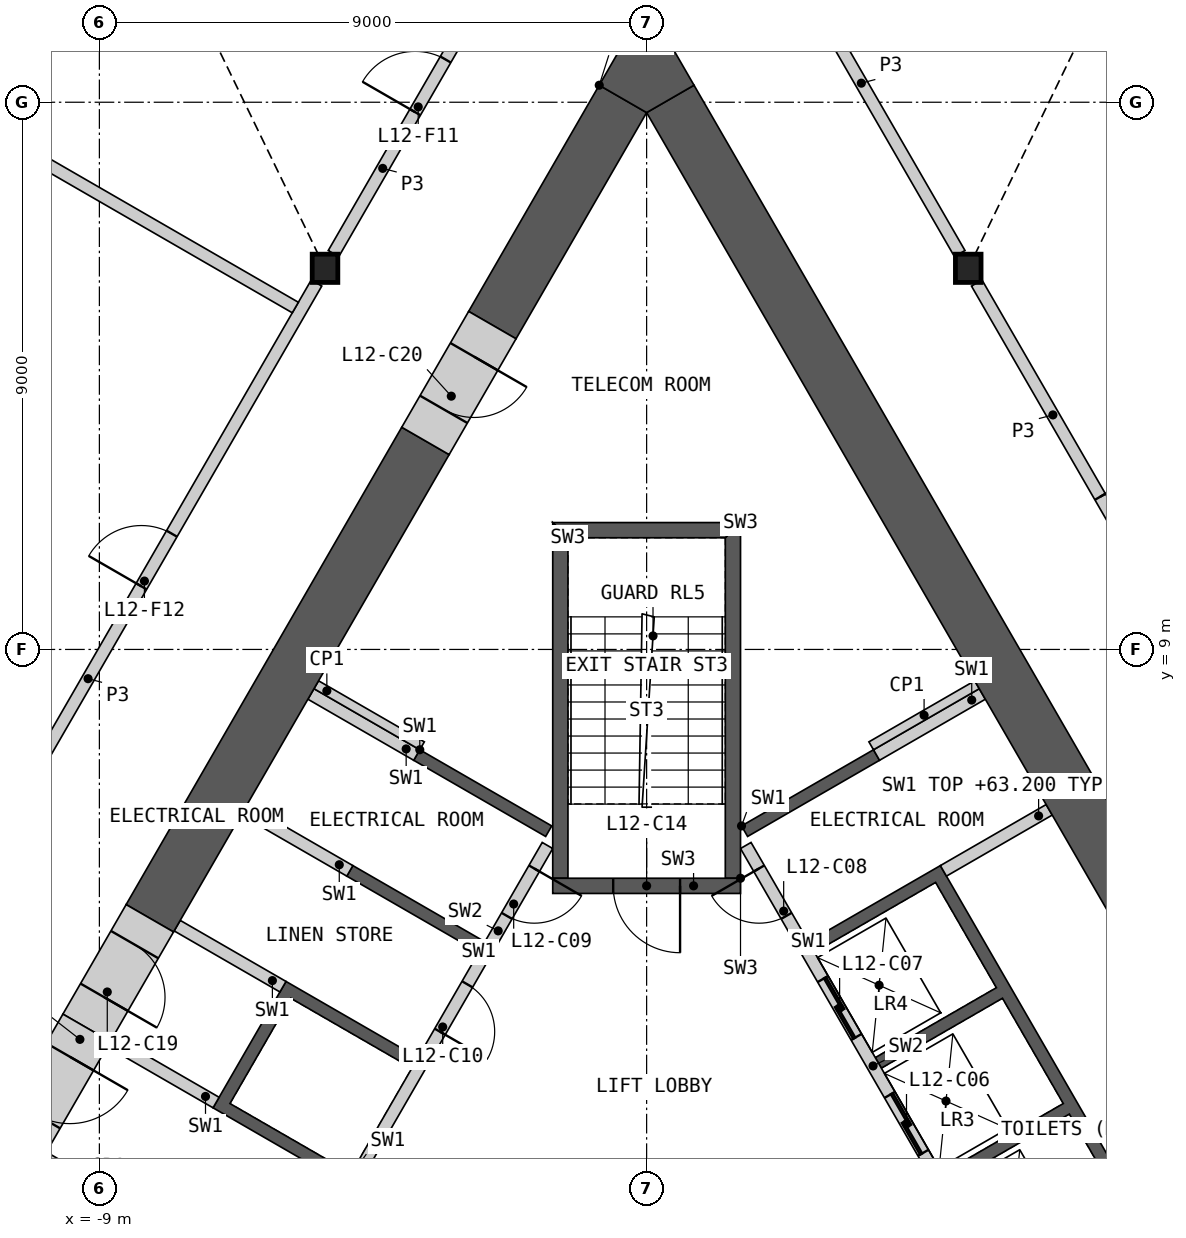
"""IFC4 building model, lengths in metres.
Left out: names, types, materials, properties, quantities, classifications, styles, units other than length and angle.
Written with IfcOpenShell. Run it as: python <this file> out.ifc"""

import sys

from ifc_helpers import new_model, si_unit, direction, frame, frame_2d, origin, origin_2d, place, context, subcontext, project, spatial, polyline, rectangle, i_section, outline, extrude, element, fill, save


model = new_model("IFC4")
c1 = context("Model", 3, precision=1e-05, world=origin(), true_north=direction((0.0, 1.0)))
c2 = subcontext(c1, "Body", "Model", "MODEL_VIEW")
j1 = project(units=[si_unit("LENGTHUNIT", "METRE"), si_unit("PLANEANGLEUNIT", "RADIAN")], contexts=[c1])
p1 = place(None, origin())
s1 = spatial("IfcSite", under=j1, at=p1, CompositionType="ELEMENT")
p2 = place(p1, origin())
s2 = spatial("IfcBuilding", under=s1, at=p2, CompositionType="ELEMENT")
p3 = place(p2, frame((0.0, 0.0, 59.4)))
s3 = spatial("IfcBuildingStorey", under=s2, at=p3, CompositionType="ELEMENT", Elevation=59.4)
for number, where, z_axis, x_axis in (
    (1, (-5.289, 15.269, 0.0), (0.0, 0.0, 1.0), (1.0, 0.0, 0.0)),
    (2, (5.289, 15.269, 0.0), (0.0, 0.0, 1.0), (1.0, 0.0, 0.0)),
):
    element("IfcColumn", number, at=place(p3, frame(where, z_axis=z_axis, x_axis=x_axis)), inside=s3, PredefinedType="COLUMN", context=c2, shape_type="SweptSolid", body=[
        extrude(i_section(OverallWidth=0.421, OverallDepth=0.465, WebThickness=0.045, FlangeThickness=0.072, at=origin_2d()), origin(), (0.0, 0.0, 1.0), 4.2),
    ])
p4 = place(p3, origin())
e3 = element("IfcWall", 3, at=p4, inside=s3, PredefinedType="SHEAR", context=c2, shape_type="SweptSolid", body=[
    extrude(outline(polyline([(1.561, 6.097), (3.731, 7.35), (3.831, 7.177), (1.66, 5.924), (1.561, 6.097)])), origin(), (0.0, 0.0, 1.0), 3.8),
])
p5 = place(p3, origin())
e4 = element("IfcWall", 4, at=p5, inside=s3, PredefinedType="SHEAR", context=c2, shape_type="SweptSolid", body=[
    extrude(outline(polyline([(2.66, 4.192), (4.831, 5.445), (8.231, -0.444), (6.061, -1.697), (5.96, -1.524), (7.952, -0.374), (6.952, 1.358), (4.96, 0.208), (4.861, 0.381), (6.852, 1.531), (5.852, 3.263), (3.861, 2.113), (3.76, 2.287), (5.752, 3.437), (4.752, 5.169), (2.76, 4.019), (2.66, 4.192)])), origin(), (0.0, 0.0, 1.0), 3.8),
])
p6 = place(p3, frame((5.817, -1.476, 0.0), z_axis=(0.0, 0.0, 1.0), x_axis=(-0.500002616675, 0.866023893041, 0.0)))
e5 = element("IfcWall", 5, at=p6, inside=s3, PredefinedType="SOLIDWALL", context=c2, shape_type="SweptSolid", body=[
    extrude(rectangle(XDim=8.373, YDim=0.2, at=frame_2d((4.187, 0.0))), origin(), (0.0, 0.0, 1.0), 3.8),
])
p7 = place(p6, frame((0.337, 0.0, 0.0)))
e6 = element("IfcOpeningElement", 6, at=p7, cuts=e5, PredefinedType="OPENING", context=c2, shape_type="SweptSolid", body=[
    extrude(rectangle(XDim=1.1, YDim=2.1, at=frame_2d((0.55, 1.05))), frame((0.0, 0.11, 0.0), z_axis=(0.0, -1.0, 0.0), x_axis=(1.0, 0.0, 0.0)), (0.0, 0.0, 1.0), 0.22),
])
p8 = place(p6, frame((2.537, 0.0, 0.0)))
e7 = element("IfcOpeningElement", 7, at=p8, cuts=e5, PredefinedType="OPENING", context=c2, shape_type="SweptSolid", body=[
    extrude(rectangle(XDim=1.1, YDim=2.1, at=frame_2d((0.55, 1.05))), frame((0.0, 0.11, 0.0), z_axis=(0.0, -1.0, 0.0), x_axis=(1.0, 0.0, 0.0)), (0.0, 0.0, 1.0), 0.22),
])
p9 = place(p6, frame((4.737, 0.0, 0.0)))
e8 = element("IfcOpeningElement", 8, at=p9, cuts=e5, PredefinedType="OPENING", context=c2, shape_type="SweptSolid", body=[
    extrude(rectangle(XDim=1.1, YDim=2.1, at=frame_2d((0.55, 1.05))), frame((0.0, 0.11, 0.0), z_axis=(0.0, -1.0, 0.0), x_axis=(1.0, 0.0, 0.0)), (0.0, 0.0, 1.0), 0.22),
])
p10 = place(p6, frame((7.037, 0.0, 0.0)))
e9 = element("IfcOpeningElement", 9, at=p10, cuts=e5, PredefinedType="OPENING", context=c2, shape_type="SweptSolid", body=[
    extrude(rectangle(XDim=0.9, YDim=2.1, at=frame_2d((0.45, 1.05))), frame((0.0, 0.11, 0.0), z_axis=(0.0, -1.0, 0.0), x_axis=(1.0, 0.0, 0.0)), (0.0, 0.0, 1.0), 0.22),
])
p11 = place(p3, frame((4.881, 5.358, 0.0), z_axis=(0.0, 0.0, 1.0), x_axis=(0.866035824272, 0.499981950752, 0.0)))
e10 = element("IfcWall", 10, at=p11, inside=s3, PredefinedType="SHEAR", context=c2, shape_type="SweptSolid", body=[
    extrude(rectangle(XDim=2.009, YDim=0.2, at=frame_2d((1.004, 0.0))), origin(), (0.0, 0.0, 1.0), 3.8),
])
p12 = place(p3, frame((3.781, 7.263, 0.0), z_axis=(0.0, 0.0, 1.0), x_axis=(0.865983199114, 0.50007309351, 0.0)))
e11 = element("IfcWall", 11, at=p12, inside=s3, PredefinedType="SHEAR", context=c2, shape_type="SweptSolid", body=[
    extrude(rectangle(XDim=2.009, YDim=0.2, at=frame_2d((1.004, 0.0))), origin(), (0.0, 0.0, 1.0), 3.8),
])
p13 = place(p3, origin())
e12 = element("IfcWall", 12, at=p13, inside=s3, PredefinedType="SHEAR", context=c2, shape_type="SweptSolid", body=[
    extrude(outline(polyline([(-4.96, 0.208), (-7.131, 1.461), (-5.931, 3.54), (-3.76, 2.287), (-3.861, 2.113), (-5.852, 3.263), (-6.852, 1.531), (-4.861, 0.381), (-4.96, 0.208)])), origin(), (0.0, 0.0, 1.0), 3.8),
])
p14 = place(p3, origin())
e13 = element("IfcWall", 13, at=p14, inside=s3, PredefinedType="SHEAR", context=c2, shape_type="SweptSolid", body=[
    extrude(outline(polyline([(-2.76, 4.019), (-4.931, 5.272), (-4.831, 5.445), (-2.66, 4.192), (-2.76, 4.019)])), origin(), (0.0, 0.0, 1.0), 3.8),
])
p15 = place(p3, origin())
e14 = element("IfcWall", 14, at=p15, inside=s3, PredefinedType="SHEAR", context=c2, shape_type="SweptSolid", body=[
    extrude(outline(polyline([(-3.731, 7.35), (-1.561, 6.097), (-1.66, 5.924), (-3.831, 7.177), (-3.731, 7.35)])), origin(), (0.0, 0.0, 1.0), 3.8),
])
p16 = place(p3, frame((-1.631, 5.776, 0.0), z_axis=(0.0, 0.0, 1.0), x_axis=(-0.499992876559, -0.866029516466, 0.0)))
e15 = element("IfcWall", 15, at=p16, inside=s3, PredefinedType="SOLIDWALL", context=c2, shape_type="SweptSolid", body=[
    extrude(rectangle(XDim=6.486, YDim=0.2, at=frame_2d((3.243, 0.0))), origin(), (0.0, 0.0, 1.0), 3.8),
])
p17 = place(p16, frame((0.437, 0.0, 0.0)))
e16 = element("IfcOpeningElement", 16, at=p17, cuts=e15, PredefinedType="OPENING", context=c2, shape_type="SweptSolid", body=[
    extrude(rectangle(XDim=0.9, YDim=2.1, at=frame_2d((0.45, 1.05))), frame((0.0, 0.11, 0.0), z_axis=(0.0, -1.0, 0.0), x_axis=(1.0, 0.0, 0.0)), (0.0, 0.0, 1.0), 0.22),
])
p18 = place(p16, frame((2.637, 0.0, 0.0)))
e17 = element("IfcOpeningElement", 17, at=p18, cuts=e15, PredefinedType="OPENING", context=c2, shape_type="SweptSolid", body=[
    extrude(rectangle(XDim=0.9, YDim=2.1, at=frame_2d((0.45, 1.05))), frame((0.0, 0.11, 0.0), z_axis=(0.0, -1.0, 0.0), x_axis=(1.0, 0.0, 0.0)), (0.0, 0.0, 1.0), 0.22),
])
p19 = place(p3, frame((-3.781, 7.263, 0.0), z_axis=(0.0, 0.0, 1.0), x_axis=(-0.865983199114, 0.50007309351, 0.0)))
e18 = element("IfcWall", 18, at=p19, inside=s3, PredefinedType="SHEAR", context=c2, shape_type="SweptSolid", body=[
    extrude(rectangle(XDim=2.009, YDim=0.2, at=frame_2d((1.004, 0.0))), origin(), (0.0, 0.0, 1.0), 3.8),
])
p20 = place(p3, frame((-4.881, 5.358, 0.0), z_axis=(0.0, 0.0, 1.0), x_axis=(-0.866035824272, 0.499981950752, 0.0)))
e19 = element("IfcWall", 19, at=p20, inside=s3, PredefinedType="SHEAR", context=c2, shape_type="SweptSolid", body=[
    extrude(rectangle(XDim=2.009, YDim=0.2, at=frame_2d((1.004, 0.0))), origin(), (0.0, 0.0, 1.0), 3.8),
])
p21 = place(p3, frame((-5.981, 3.453, 0.0), z_axis=(0.0, 0.0, 1.0), x_axis=(-0.866013584312, 0.500020471368, 0.0)))
e20 = element("IfcWall", 20, at=p21, inside=s3, PredefinedType="SHEAR", context=c2, shape_type="SweptSolid", body=[
    extrude(rectangle(XDim=2.009, YDim=0.2, at=frame_2d((1.005, 0.0))), origin(), (0.0, 0.0, 1.0), 3.8),
])
p22 = place(p3, frame((-7.081, 1.548, 0.0), z_axis=(0.0, 0.0, 1.0), x_axis=(-0.865983199114, 0.50007309351, 0.0)))
e21 = element("IfcWall", 21, at=p22, inside=s3, PredefinedType="SHEAR", context=c2, shape_type="SweptSolid", body=[
    extrude(rectangle(XDim=2.009, YDim=0.2, at=frame_2d((1.004, 0.0))), origin(), (0.0, 0.0, 1.0), 3.8),
])
p23 = place(p3, frame((-8.181, -0.357, 0.0), z_axis=(0.0, 0.0, 1.0), x_axis=(-0.866035824272, 0.499981950752, 0.0)))
e22 = element("IfcWall", 22, at=p23, inside=s3, PredefinedType="SHEAR", context=c2, shape_type="SweptSolid", body=[
    extrude(rectangle(XDim=2.009, YDim=0.2, at=frame_2d((1.004, 0.0))), origin(), (0.0, 0.0, 1.0), 3.8),
])
p24 = place(p3, origin())
e23 = element("IfcWall", 23, at=p24, inside=s3, PredefinedType="SHEAR", context=c2, shape_type="SweptSolid", body=[
    extrude(outline(polyline([(1.544, 5.237), (1.544, 11.087), (1.294, 10.837), (1.294, 5.237), (1.544, 5.237)])), origin(), (0.0, 0.0, 1.0), 3.8),
])
p25 = place(p3, origin())
e24 = element("IfcWall", 24, at=p25, inside=s3, PredefinedType="SHEAR", context=c2, shape_type="SweptSolid", body=[
    extrude(outline(polyline([(1.544, 11.087), (-1.544, 11.087), (-1.294, 10.837), (1.294, 10.837), (1.544, 11.087)])), origin(), (0.0, 0.0, 1.0), 3.8),
])
p26 = place(p3, origin())
e25 = element("IfcWall", 25, at=p26, inside=s3, PredefinedType="SHEAR", context=c2, shape_type="SweptSolid", body=[
    extrude(outline(polyline([(-1.294, 10.837), (-1.544, 11.087), (-1.544, 5.237), (-1.294, 5.237), (-1.294, 10.837)])), origin(), (0.0, 0.0, 1.0), 3.8),
])
p27 = place(p3, frame((1.544, 5.112, 0.0), z_axis=(0.0, 0.0, 1.0), x_axis=(-1.0, 0.0, 0.0)))
e26 = element("IfcWall", 26, at=p27, inside=s3, PredefinedType="SHEAR", context=c2, shape_type="SweptSolid", body=[
    extrude(rectangle(XDim=3.088, YDim=0.25, at=frame_2d((1.544, 0.0))), origin(), (0.0, 0.0, 1.0), 3.8),
])
p28 = place(p27, frame((0.994, 0.0, 0.0)))
e27 = element("IfcOpeningElement", 27, at=p28, cuts=e26, PredefinedType="OPENING", context=c2, shape_type="SweptSolid", body=[
    extrude(rectangle(XDim=1.1, YDim=2.1, at=frame_2d((0.55, 1.05))), frame((0.0, 0.135, 0.0), z_axis=(0.0, -1.0, 0.0), x_axis=(1.0, 0.0, 0.0)), (0.0, 0.0, 1.0), 0.27),
])
for number, where, z_axis, x_axis in (
    (28, (3.693, 7.415, 0.0), (0.0, 0.0, 1.0), (0.866, 0.5, 0.0)),
    (29, (-3.693, 7.415, 0.0), (0.0, 0.0, 1.0), (-0.866, 0.5, 0.0)),
):
    element("IfcWall", number, at=place(p3, frame(where, z_axis=z_axis, x_axis=x_axis)), inside=s3, PredefinedType="PARTITIONING", context=c2, shape_type="SweptSolid", body=[
        extrude(rectangle(XDim=2.009, YDim=0.15, at=frame_2d((1.004, 0.0))), origin(), (0.0, 0.0, 1.0), 3.8),
    ])
p29 = place(p3, frame((8.16, 4.596, 0.0), z_axis=(0.0, 0.0, 1.0), x_axis=(-0.500009830349, 0.866019728156, 0.0)))
e30 = element("IfcWall", 30, at=p29, inside=s3, PredefinedType="SHEAR", context=c2, shape_type="SweptSolid", body=[
    extrude(rectangle(XDim=15.541, YDim=0.9, at=frame_2d((7.771, 0.0))), origin(), (0.0, 0.0, 1.0), 3.8),
])
p30 = place(p3, frame((-3.637, 12.43, 0.0), z_axis=(0.0, 0.0, 1.0), x_axis=(-0.500011513458, -0.866018756384, 0.0)))
e31 = element("IfcWall", 31, at=p30, inside=s3, PredefinedType="SHEAR", context=c2, shape_type="SweptSolid", body=[
    extrude(rectangle(XDim=9.066, YDim=0.9, at=frame_2d((4.533, 0.0))), origin(), (0.0, 0.0, 1.0), 3.8),
])
p31 = place(p3, frame((-0.39, 18.055, 0.0), z_axis=(0.0, 0.0, 1.0), x_axis=(-0.500014347272, -0.866017120224, 0.0)))
e32 = element("IfcWall", 32, at=p31, inside=s3, PredefinedType="SHEAR", context=c2, shape_type="SweptSolid", body=[
    extrude(rectangle(XDim=4.296, YDim=0.9, at=frame_2d((2.148, 0.0))), origin(), (0.0, 0.0, 1.0), 3.8),
])
p32 = place(p3, origin())
e33 = element("IfcWall", 33, at=p32, inside=s3, PredefinedType="SHEAR", context=c2, shape_type="SweptSolid", body=[
    extrude(outline(polyline([(-0.779, 18.28), (0.0, 19.63), (0.779, 18.28), (0.0, 17.83), (-0.779, 18.28)])), origin(), (0.0, 0.0, 1.0), 3.8),
])
p33 = place(p3, frame((-8.17, 4.579, 0.0), z_axis=(0.0, 0.0, 1.0), x_axis=(-0.499888406853, -0.866089822532, 0.0)))
e34 = element("IfcWall", 34, at=p33, inside=s3, PredefinedType="SHEAR", context=c2, shape_type="SweptSolid", body=[
    extrude(rectangle(XDim=2.08, YDim=0.9, at=frame_2d((1.04, 0.0))), origin(), (0.0, 0.0, 1.0), 3.8),
])
p34 = place(p33, frame((0.5, 0.0, 0.0)))
e35 = element("IfcOpeningElement", 35, at=p34, cuts=e34, PredefinedType="OPENING", context=c2, shape_type="SweptSolid", body=[
    extrude(rectangle(XDim=1.0, YDim=2.1, at=frame_2d((0.5, 1.05))), frame((0.0, 0.46, 0.0), z_axis=(0.0, -1.0, 0.0), x_axis=(1.0, 0.0, 0.0)), (0.0, 0.0, 1.0), 0.92),
])
p35 = place(p3, frame((-2.538, 14.335, 0.0), z_axis=(0.0, 0.0, 1.0), x_axis=(-0.499994660107, -0.866028486751, 0.0)))
e36 = element("IfcWall", 36, at=p35, inside=s3, PredefinedType="SHEAR", context=c2, shape_type="SweptSolid", body=[
    extrude(rectangle(XDim=2.2, YDim=0.9, at=frame_2d((1.1, 0.0))), origin(), (0.0, 0.0, 1.0), 3.8),
])
p36 = place(p35, frame((0.6, 0.0, 0.0)))
e37 = element("IfcOpeningElement", 37, at=p36, cuts=e36, PredefinedType="OPENING", context=c2, shape_type="SweptSolid", body=[
    extrude(rectangle(XDim=1.0, YDim=2.1, at=frame_2d((0.5, 1.05))), frame((0.0, 0.46, 0.0), z_axis=(0.0, -1.0, 0.0), x_axis=(1.0, 0.0, 0.0)), (0.0, 0.0, 1.0), 0.92),
])
p37 = place(p3, frame((-9.21, 2.777, 0.0), z_axis=(0.0, 0.0, 1.0), x_axis=(-0.500077893725, -0.86598042715, 0.0)))
e38 = element("IfcWall", 38, at=p37, inside=s3, PredefinedType="SHEAR", context=c2, shape_type="SweptSolid", body=[
    extrude(rectangle(XDim=2.2, YDim=0.9, at=frame_2d((1.1, 0.0))), origin(), (0.0, 0.0, 1.0), 3.8),
])
p38 = place(p37, frame((0.55, 0.0, 0.0)))
e39 = element("IfcOpeningElement", 39, at=p38, cuts=e38, PredefinedType="OPENING", context=c2, shape_type="SweptSolid", body=[
    extrude(rectangle(XDim=1.1, YDim=2.1, at=frame_2d((0.55, 1.05))), frame((0.0, 0.46, 0.0), z_axis=(0.0, -1.0, 0.0), x_axis=(1.0, 0.0, 0.0)), (0.0, 0.0, 1.0), 0.92),
])
p39 = place(p3, frame((5.429, 15.026, 0.0), z_axis=(0.0, 0.0, 1.0), x_axis=(0.50001002959, -0.86601961312, 0.0)))
e40 = element("IfcWall", 40, at=p39, inside=s3, PredefinedType="PARTITIONING", context=c2, shape_type="SweptSolid", body=[
    extrude(rectangle(XDim=10.019, YDim=0.2, at=frame_2d((5.009, 0.0))), origin(), (0.0, 0.0, 1.0), 3.8),
])
p40 = place(p39, frame((4.059, 0.0, 0.0)))
e41 = element("IfcOpeningElement", 41, at=p40, cuts=e40, PredefinedType="OPENING", context=c2, shape_type="SweptSolid", body=[
    extrude(rectangle(XDim=1.8, YDim=2.1, at=frame_2d((0.9, 1.05))), frame((0.0, 0.11, 0.0), z_axis=(0.0, -1.0, 0.0), x_axis=(1.0, 0.0, 0.0)), (0.0, 0.0, 1.0), 0.22),
])
p41 = place(p3, frame((-10.439, 6.35, 0.0), z_axis=(0.0, 0.0, 1.0), x_axis=(0.50001002959, 0.86601961312, 0.0)))
e42 = element("IfcWall", 42, at=p41, inside=s3, PredefinedType="PARTITIONING", context=c2, shape_type="SweptSolid", body=[
    extrude(rectangle(XDim=10.019, YDim=0.2, at=frame_2d((5.009, 0.0))), origin(), (0.0, 0.0, 1.0), 3.8),
])
p42 = place(p41, frame((4.259, 0.0, 0.0)))
e43 = element("IfcOpeningElement", 43, at=p42, cuts=e42, PredefinedType="OPENING", context=c2, shape_type="SweptSolid", body=[
    extrude(rectangle(XDim=1.0, YDim=2.1, at=frame_2d((0.5, 1.05))), frame((0.0, 0.11, 0.0), z_axis=(0.0, -1.0, 0.0), x_axis=(1.0, 0.0, 0.0)), (0.0, 0.0, 1.0), 0.22),
])
p43 = place(p3, frame((1.913, 21.116, 0.0), z_axis=(0.0, 0.0, 1.0), x_axis=(0.500001069878, -0.866024786089, 0.0)))
e44 = element("IfcWall", 44, at=p43, inside=s3, PredefinedType="PARTITIONING", context=c2, shape_type="SweptSolid", body=[
    extrude(rectangle(XDim=6.473, YDim=0.2, at=frame_2d((3.236, 0.0))), origin(), (0.0, 0.0, 1.0), 3.8),
])
p44 = place(p3, frame((-5.149, 15.511, 0.0), z_axis=(0.0, 0.0, 1.0), x_axis=(0.500001069878, 0.866024786089, 0.0)))
e45 = element("IfcWall", 45, at=p44, inside=s3, PredefinedType="PARTITIONING", context=c2, shape_type="SweptSolid", body=[
    extrude(rectangle(XDim=6.473, YDim=0.2, at=frame_2d((3.236, 0.0))), origin(), (0.0, 0.0, 1.0), 3.8),
])
p45 = place(p44, frame((2.686, 0.0, 0.0)))
e46 = element("IfcOpeningElement", 46, at=p45, cuts=e45, PredefinedType="OPENING", context=c2, shape_type="SweptSolid", body=[
    extrude(rectangle(XDim=1.0, YDim=2.1, at=frame_2d((0.5, 1.05))), frame((0.0, 0.11, 0.0), z_axis=(0.0, -1.0, 0.0), x_axis=(1.0, 0.0, 0.0)), (0.0, 0.0, 1.0), 0.22),
])
p46 = place(p3, frame((-16.981, 21.092, 0.0), z_axis=(0.0, 0.0, 1.0), x_axis=(0.866026884493, -0.499997435328, 0.0)))
e47 = element("IfcWall", 47, at=p46, inside=s3, PredefinedType="PARTITIONING", context=c2, shape_type="SweptSolid", body=[
    extrude(rectangle(XDim=12.937, YDim=0.2, at=frame_2d((6.469, 0.0))), origin(), (0.0, 0.0, 1.0), 2.885),
])
p47 = place(p8, origin())
e48 = element("IfcDoor", 48, at=p47, inside=s3, OperationType="SLIDING_TO_LEFT", PredefinedType="DOOR", context=c2, shape_type="SweptSolid", body=[
    extrude(rectangle(XDim=1.1, YDim=2.1, at=frame_2d((0.55, 1.05))), frame((0.0, 0.025, 0.0), z_axis=(0.0, -1.0, 0.0), x_axis=(1.0, 0.0, 0.0)), (0.0, 0.0, 1.0), 0.05),
])
fill(e7, e48)
p48 = place(p9, origin())
e49 = element("IfcDoor", 49, at=p48, inside=s3, OperationType="SLIDING_TO_LEFT", PredefinedType="DOOR", context=c2, shape_type="SweptSolid", body=[
    extrude(rectangle(XDim=1.1, YDim=2.1, at=frame_2d((0.55, 1.05))), frame((0.0, 0.025, 0.0), z_axis=(0.0, -1.0, 0.0), x_axis=(1.0, 0.0, 0.0)), (0.0, 0.0, 1.0), 0.05),
])
fill(e8, e49)
p49 = place(p10, origin())
e50 = element("IfcDoor", 50, at=p49, inside=s3, OperationType="SINGLE_SWING_RIGHT", PredefinedType="DOOR", context=c2, shape_type="SweptSolid", body=[
    extrude(rectangle(XDim=0.9, YDim=2.1, at=frame_2d((0.45, 1.05))), frame((0.0, 0.025, 0.0), z_axis=(0.0, -1.0, 0.0), x_axis=(1.0, 0.0, 0.0)), (0.0, 0.0, 1.0), 0.05),
])
fill(e9, e50)
p50 = place(p17, origin())
e51 = element("IfcDoor", 51, at=p50, inside=s3, OperationType="SINGLE_SWING_LEFT", PredefinedType="DOOR", context=c2, shape_type="SweptSolid", body=[
    extrude(rectangle(XDim=0.9, YDim=2.1, at=frame_2d((0.45, 1.05))), frame((0.0, 0.025, 0.0), z_axis=(0.0, -1.0, 0.0), x_axis=(1.0, 0.0, 0.0)), (0.0, 0.0, 1.0), 0.05),
])
fill(e16, e51)
p51 = place(p18, origin())
e52 = element("IfcDoor", 52, at=p51, inside=s3, OperationType="SINGLE_SWING_RIGHT", PredefinedType="DOOR", context=c2, shape_type="SweptSolid", body=[
    extrude(rectangle(XDim=0.9, YDim=2.1, at=frame_2d((0.45, 1.05))), frame((0.0, 0.025, 0.0), z_axis=(0.0, -1.0, 0.0), x_axis=(1.0, 0.0, 0.0)), (0.0, 0.0, 1.0), 0.05),
])
fill(e17, e52)
p52 = place(p28, origin())
e53 = element("IfcDoor", 53, at=p52, inside=s3, OperationType="SINGLE_SWING_LEFT", PredefinedType="DOOR", context=c2, shape_type="SweptSolid", body=[
    extrude(rectangle(XDim=1.1, YDim=2.1, at=frame_2d((0.55, 1.05))), frame((0.0, 0.025, 0.0), z_axis=(0.0, -1.0, 0.0), x_axis=(1.0, 0.0, 0.0)), (0.0, 0.0, 1.0), 0.05),
])
fill(e27, e53)
p53 = place(p34, origin())
e54 = element("IfcDoor", 54, at=p53, inside=s3, OperationType="SINGLE_SWING_RIGHT", PredefinedType="DOOR", context=c2, shape_type="SweptSolid", body=[
    extrude(rectangle(XDim=1.0, YDim=2.1, at=frame_2d((0.5, 1.05))), frame((0.0, 0.205, 0.0), z_axis=(0.0, -1.0, 0.0), x_axis=(1.0, 0.0, 0.0)), (0.0, 0.0, 1.0), 0.05),
])
fill(e35, e54)
p54 = place(p36, origin())
e55 = element("IfcDoor", 55, at=p54, inside=s3, OperationType="SINGLE_SWING_LEFT", PredefinedType="DOOR", context=c2, shape_type="SweptSolid", body=[
    extrude(rectangle(XDim=1.0, YDim=2.1, at=frame_2d((0.5, 1.05))), frame((0.0, 0.205, 0.0), z_axis=(0.0, -1.0, 0.0), x_axis=(1.0, 0.0, 0.0)), (0.0, 0.0, 1.0), 0.05),
])
fill(e37, e55)
p55 = place(p38, origin())
e56 = element("IfcDoor", 56, at=p55, inside=s3, OperationType="SINGLE_SWING_LEFT", PredefinedType="DOOR", context=c2, shape_type="SweptSolid", body=[
    extrude(rectangle(XDim=1.1, YDim=2.1, at=frame_2d((0.55, 1.05))), frame((0.0, 0.205, 0.0), z_axis=(0.0, -1.0, 0.0), x_axis=(1.0, 0.0, 0.0)), (0.0, 0.0, 1.0), 0.05),
])
fill(e39, e56)
p56 = place(p40, origin())
e57 = element("IfcDoor", 57, at=p56, inside=s3, OperationType="DOUBLE_DOOR_SINGLE_SWING", PredefinedType="DOOR", context=c2, shape_type="SweptSolid", body=[
    extrude(rectangle(XDim=1.8, YDim=2.1, at=frame_2d((0.9, 1.05))), frame((0.0, 0.025, 0.0), z_axis=(0.0, -1.0, 0.0), x_axis=(1.0, 0.0, 0.0)), (0.0, 0.0, 1.0), 0.05),
])
fill(e41, e57)
p57 = place(p45, origin())
e58 = element("IfcDoor", 58, at=p57, inside=s3, OperationType="SINGLE_SWING_LEFT", PredefinedType="DOOR", context=c2, shape_type="SweptSolid", body=[
    extrude(rectangle(XDim=1.0, YDim=2.1, at=frame_2d((0.5, 1.05))), frame((0.0, 0.025, 0.0), z_axis=(0.0, -1.0, 0.0), x_axis=(1.0, 0.0, 0.0)), (0.0, 0.0, 1.0), 0.05),
])
fill(e46, e58)
p58 = place(p42, origin())
e59 = element("IfcDoor", 59, at=p58, inside=s3, OperationType="SINGLE_SWING_LEFT", PredefinedType="DOOR", context=c2, shape_type="SweptSolid", body=[
    extrude(rectangle(XDim=1.0, YDim=2.1, at=frame_2d((0.5, 1.05))), frame((0.0, 0.025, 0.0), z_axis=(0.0, -1.0, 0.0), x_axis=(1.0, 0.0, 0.0)), (0.0, 0.0, 1.0), 0.05),
])
fill(e43, e59)
save(model, sys.argv[1])
